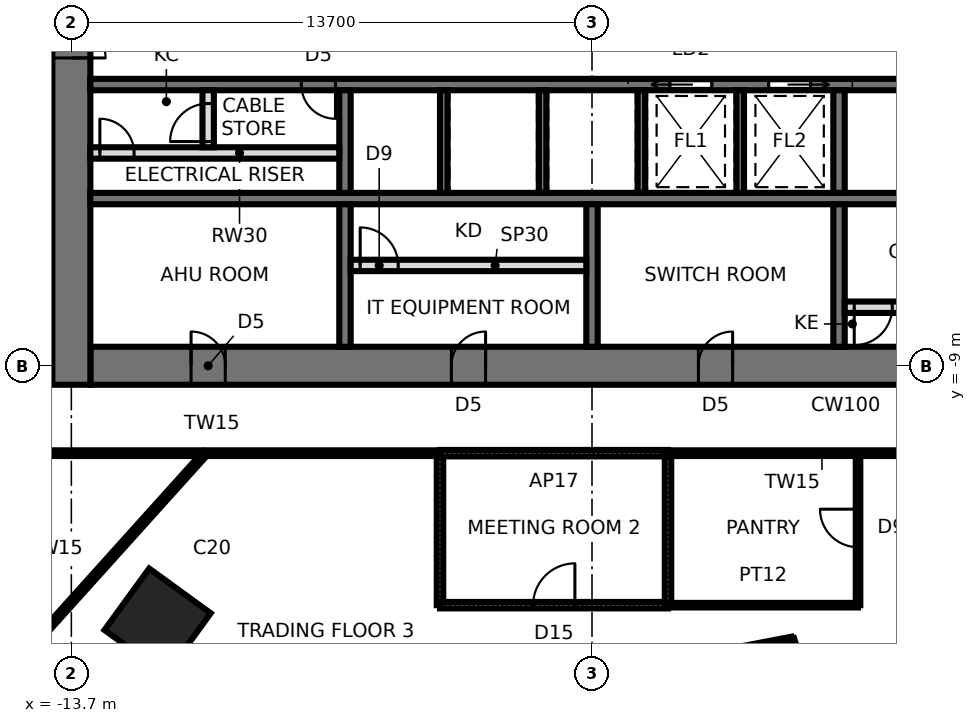
"""IFC4 building model, lengths in metres.
Left out: names, types, materials, properties, quantities, classifications, styles, units other than length and angle.
Written with IfcOpenShell. Run it as: python <this file> out.ifc"""

import sys

from ifc_helpers import new_model, si_unit, direction, frame, frame_2d, origin, origin_2d, place, context, subcontext, project, spatial, rectangle, extrude, element, fill, save


model = new_model("IFC4")
c1 = context("Model", 3, precision=1e-05, world=origin(), true_north=direction((0.0, 1.0)))
c2 = subcontext(c1, "Body", "Model", "MODEL_VIEW")
j1 = project(units=[si_unit("LENGTHUNIT", "METRE"), si_unit("PLANEANGLEUNIT", "RADIAN")], contexts=[c1])
p1 = place(None, origin())
s1 = spatial("IfcSite", under=j1, at=p1, CompositionType="ELEMENT")
p2 = place(p1, origin())
s2 = spatial("IfcBuilding", under=s1, at=p2, CompositionType="ELEMENT")
p3 = place(p2, frame((0.0, 0.0, 65.8)))
s3 = spatial("IfcBuildingStorey", under=s2, at=p3, CompositionType="ELEMENT", Elevation=65.8)
p4 = place(p3, frame((-11.43, -15.733, 0.0), z_axis=(0.0, 0.0, 1.0), x_axis=(-0.587785252292, -0.809016994375, 0.0)))
e1 = element("IfcColumn", 1, at=p4, inside=s3, PredefinedType="COLUMN", context=c2, shape_type="SweptSolid", body=[
    extrude(rectangle(XDim=2.0, YDim=2.0, at=origin_2d()), origin(), (0.0, 0.0, 1.0), 4.2),
])
p5 = place(p3, frame((-13.2, -9.0, 0.0), z_axis=(0.0, 0.0, 1.0), x_axis=(1.0, 0.0, 0.0)))
e2 = element("IfcWall", 2, at=p5, inside=s3, PredefinedType="SHEAR", context=c2, shape_type="SweptSolid", body=[
    extrude(rectangle(XDim=26.4, YDim=1.0, at=frame_2d((13.2, 0.0))), origin(), (0.0, 0.0, 1.0), 4.2),
])
p6 = place(p5, frame((2.65, 0.0, 0.0)))
e3 = element("IfcOpeningElement", 3, at=p6, cuts=e2, PredefinedType="OPENING", context=c2, shape_type="SweptSolid", body=[
    extrude(rectangle(XDim=0.9, YDim=2.1, at=frame_2d((0.45, 1.05))), frame((0.0, 0.51, 0.0), z_axis=(0.0, -1.0, 0.0), x_axis=(1.0, 0.0, 0.0)), (0.0, 0.0, 1.0), 1.02),
])
p7 = place(p5, frame((9.5, 0.0, 0.0)))
e4 = element("IfcOpeningElement", 4, at=p7, cuts=e2, PredefinedType="OPENING", context=c2, shape_type="SweptSolid", body=[
    extrude(rectangle(XDim=0.9, YDim=2.1, at=frame_2d((0.45, 1.05))), frame((0.0, 0.51, 0.0), z_axis=(0.0, -1.0, 0.0), x_axis=(1.0, 0.0, 0.0)), (0.0, 0.0, 1.0), 1.02),
])
p8 = place(p5, frame((16.0, 0.0, 0.0)))
e5 = element("IfcOpeningElement", 5, at=p8, cuts=e2, PredefinedType="OPENING", context=c2, shape_type="SweptSolid", body=[
    extrude(rectangle(XDim=0.9, YDim=2.1, at=frame_2d((0.45, 1.05))), frame((0.0, 0.51, 0.0), z_axis=(0.0, -1.0, 0.0), x_axis=(1.0, 0.0, 0.0)), (0.0, 0.0, 1.0), 1.02),
])
p9 = place(p5, frame((22.85, 0.0, 0.0)))
e6 = element("IfcOpeningElement", 6, at=p9, cuts=e2, PredefinedType="OPENING", context=c2, shape_type="SweptSolid", body=[
    extrude(rectangle(XDim=0.9, YDim=2.1, at=frame_2d((0.45, 1.05))), frame((0.0, 0.51, 0.0), z_axis=(0.0, -1.0, 0.0), x_axis=(1.0, 0.0, 0.0)), (0.0, 0.0, 1.0), 1.02),
])
p10 = place(p3, frame((-13.7, 9.5, 0.0), z_axis=(0.0, 0.0, 1.0), x_axis=(0.0, -1.0, 0.0)))
e7 = element("IfcWall", 7, at=p10, inside=s3, PredefinedType="SHEAR", context=c2, shape_type="SweptSolid", body=[
    extrude(rectangle(XDim=19.0, YDim=1.0, at=frame_2d((9.5, 0.0))), origin(), (0.0, 0.0, 1.0), 4.2),
])
p11 = place(p10, frame((8.6, 0.0, 0.0)))
e8 = element("IfcOpeningElement", 8, at=p11, cuts=e7, PredefinedType="OPENING", context=c2, shape_type="SweptSolid", body=[
    extrude(rectangle(XDim=1.8, YDim=2.4, at=frame_2d((0.9, 1.2))), frame((0.0, 0.51, 0.0), z_axis=(0.0, -1.0, 0.0), x_axis=(1.0, 0.0, 0.0)), (0.0, 0.0, 1.0), 1.02),
])
p12 = place(p3, frame((-13.2, -1.6, 0.0), z_axis=(0.0, 0.0, 1.0), x_axis=(1.0, 0.0, 0.0)))
e9 = element("IfcWall", 9, at=p12, inside=s3, PredefinedType="SHEAR", context=c2, shape_type="SweptSolid", body=[
    extrude(rectangle(XDim=26.4, YDim=0.3, at=frame_2d((13.2, 0.0))), origin(), (0.0, 0.0, 1.0), 4.2),
])
p13 = place(p12, frame((25.15, 0.0, 0.0)))
e10 = element("IfcOpeningElement", 10, at=p13, cuts=e9, PredefinedType="OPENING", context=c2, shape_type="SweptSolid", body=[
    extrude(rectangle(XDim=1.0, YDim=2.1, at=frame_2d((0.5, 1.05))), frame((0.0, 0.16, 0.0), z_axis=(0.0, -1.0, 0.0), x_axis=(1.0, 0.0, 0.0)), (0.0, 0.0, 1.0), 0.32),
])
p14 = place(p12, frame((15.25, 0.0, 0.0)))
e11 = element("IfcOpeningElement", 11, at=p14, cuts=e9, PredefinedType="OPENING", context=c2, shape_type="SweptSolid", body=[
    extrude(rectangle(XDim=1.1, YDim=2.3, at=frame_2d((0.55, 1.15))), frame((0.0, 0.16, 0.0), z_axis=(0.0, -1.0, 0.0), x_axis=(1.0, 0.0, 0.0)), (0.0, 0.0, 1.0), 0.32),
])
p15 = place(p12, frame((17.85, 0.0, 0.0)))
e12 = element("IfcOpeningElement", 12, at=p15, cuts=e9, PredefinedType="OPENING", context=c2, shape_type="SweptSolid", body=[
    extrude(rectangle(XDim=1.1, YDim=2.3, at=frame_2d((0.55, 1.15))), frame((0.0, 0.16, 0.0), z_axis=(0.0, -1.0, 0.0), x_axis=(1.0, 0.0, 0.0)), (0.0, 0.0, 1.0), 0.32),
])
p16 = place(p12, frame((5.55, 0.0, 0.0)))
e13 = element("IfcOpeningElement", 13, at=p16, cuts=e9, PredefinedType="OPENING", context=c2, shape_type="SweptSolid", body=[
    extrude(rectangle(XDim=0.9, YDim=2.1, at=frame_2d((0.45, 1.05))), frame((0.0, 0.16, 0.0), z_axis=(0.0, -1.0, 0.0), x_axis=(1.0, 0.0, 0.0)), (0.0, 0.0, 1.0), 0.32),
])
p17 = place(p3, frame((-13.2, -4.6, 0.0), z_axis=(0.0, 0.0, 1.0), x_axis=(1.0, 0.0, 0.0)))
e14 = element("IfcWall", 14, at=p17, inside=s3, PredefinedType="SHEAR", context=c2, shape_type="SweptSolid", body=[
    extrude(rectangle(XDim=26.4, YDim=0.3, at=frame_2d((13.2, 0.0))), origin(), (0.0, 0.0, 1.0), 4.2),
])
p18 = place(p3, frame((-6.5, -1.75, 0.0), z_axis=(0.0, 0.0, 1.0), x_axis=(0.0, -1.0, 0.0)))
e15 = element("IfcWall", 15, at=p18, inside=s3, PredefinedType="SHEAR", context=c2, shape_type="SweptSolid", body=[
    extrude(rectangle(XDim=2.7, YDim=0.3, at=frame_2d((1.35, 0.0))), origin(), (0.0, 0.0, 1.0), 4.2),
])
p19 = place(p3, frame((-6.5, -4.75, 0.0), z_axis=(0.0, 0.0, 1.0), x_axis=(0.0, -1.0, 0.0)))
e16 = element("IfcWall", 16, at=p19, inside=s3, PredefinedType="SHEAR", context=c2, shape_type="SweptSolid", body=[
    extrude(rectangle(XDim=3.75, YDim=0.3, at=frame_2d((1.875, 0.0))), origin(), (0.0, 0.0, 1.0), 4.2),
])
p20 = place(p3, frame((6.5, -1.75, 0.0), z_axis=(0.0, 0.0, 1.0), x_axis=(0.0, -1.0, 0.0)))
e17 = element("IfcWall", 17, at=p20, inside=s3, PredefinedType="SHEAR", context=c2, shape_type="SweptSolid", body=[
    extrude(rectangle(XDim=2.7, YDim=0.3, at=frame_2d((1.35, 0.0))), origin(), (0.0, 0.0, 1.0), 4.2),
])
p21 = place(p3, frame((6.5, -4.75, 0.0), z_axis=(0.0, 0.0, 1.0), x_axis=(0.0, -1.0, 0.0)))
e18 = element("IfcWall", 18, at=p21, inside=s3, PredefinedType="SHEAR", context=c2, shape_type="SweptSolid", body=[
    extrude(rectangle(XDim=3.75, YDim=0.3, at=frame_2d((1.875, 0.0))), origin(), (0.0, 0.0, 1.0), 4.2),
])
for number, where, z_axis, x_axis in (
    (19, (-3.9, -1.75, 0.0), (0.0, 0.0, 1.0), (0.0, -1.0, 0.0)),
    (20, (-1.3, -1.75, 0.0), (0.0, 0.0, 1.0), (0.0, -1.0, 0.0)),
    (21, (1.3, -1.75, 0.0), (0.0, 0.0, 1.0), (0.0, -1.0, 0.0)),
    (22, (3.9, -1.75, 0.0), (0.0, 0.0, 1.0), (0.0, -1.0, 0.0)),
):
    element("IfcWall", number, at=place(p3, frame(where, z_axis=z_axis, x_axis=x_axis)), inside=s3, PredefinedType="SHEAR", context=c2, shape_type="SweptSolid", body=[
        extrude(rectangle(XDim=2.7, YDim=0.2, at=frame_2d((1.35, 0.0))), origin(), (0.0, 0.0, 1.0), 4.2),
    ])
p22 = place(p3, frame((0.0, -4.75, 0.0), z_axis=(0.0, 0.0, 1.0), x_axis=(0.0, -1.0, 0.0)))
e23 = element("IfcWall", 23, at=p22, inside=s3, PredefinedType="SHEAR", context=c2, shape_type="SweptSolid", body=[
    extrude(rectangle(XDim=3.75, YDim=0.3, at=frame_2d((1.875, 0.0))), origin(), (0.0, 0.0, 1.0), 4.2),
])
p23 = place(p3, frame((-6.35, -6.36, 0.0), z_axis=(0.0, 0.0, 1.0), x_axis=(1.0, 0.0, 0.0)))
e24 = element("IfcWall", 24, at=p23, inside=s3, PredefinedType="PARTITIONING", context=c2, shape_type="SweptSolid", body=[
    extrude(rectangle(XDim=6.2, YDim=0.3, at=frame_2d((3.1, 0.0))), origin(), (0.0, 0.0, 1.0), 4.04),
])
p24 = place(p23, frame((0.25, 0.0, 0.0)))
e25 = element("IfcOpeningElement", 25, at=p24, cuts=e24, PredefinedType="OPENING", context=c2, shape_type="SweptSolid", body=[
    extrude(rectangle(XDim=1.0, YDim=2.4, at=frame_2d((0.5, 1.2))), frame((0.0, 0.16, 0.0), z_axis=(0.0, -1.0, 0.0), x_axis=(1.0, 0.0, 0.0)), (0.0, 0.0, 1.0), 0.32),
])
p25 = place(p3, frame((6.65, -7.46, 0.0), z_axis=(0.0, 0.0, 1.0), x_axis=(1.0, 0.0, 0.0)))
e26 = element("IfcWall", 26, at=p25, inside=s3, PredefinedType="PARTITIONING", context=c2, shape_type="SweptSolid", body=[
    extrude(rectangle(XDim=6.55, YDim=0.3, at=frame_2d((3.275, 0.0))), origin(), (0.0, 0.0, 1.0), 4.04),
])
p26 = place(p25, frame((0.25, 0.0, 0.0)))
e27 = element("IfcOpeningElement", 27, at=p26, cuts=e26, PredefinedType="OPENING", context=c2, shape_type="SweptSolid", body=[
    extrude(rectangle(XDim=1.0, YDim=2.4, at=frame_2d((0.5, 1.2))), frame((0.0, 0.16, 0.0), z_axis=(0.0, -1.0, 0.0), x_axis=(1.0, 0.0, 0.0)), (0.0, 0.0, 1.0), 0.32),
])
p27 = place(p3, frame((-13.2, -3.4, 0.0), z_axis=(0.0, 0.0, 1.0), x_axis=(1.0, 0.0, 0.0)))
e28 = element("IfcWall", 28, at=p27, inside=s3, PredefinedType="SOLIDWALL", context=c2, shape_type="SweptSolid", body=[
    extrude(rectangle(XDim=6.55, YDim=0.3, at=frame_2d((3.275, 0.0))), origin(), (0.0, 0.0, 1.0), 4.04),
])
p28 = place(p27, frame((0.25, 0.0, 0.0)))
e29 = element("IfcOpeningElement", 29, at=p28, cuts=e28, PredefinedType="OPENING", context=c2, shape_type="SweptSolid", body=[
    extrude(rectangle(XDim=0.9, YDim=2.1, at=frame_2d((0.45, 1.05))), frame((0.0, 0.16, 0.0), z_axis=(0.0, -1.0, 0.0), x_axis=(1.0, 0.0, 0.0)), (0.0, 0.0, 1.0), 0.32),
])
p29 = place(p3, frame((-10.1, -3.25, 0.0), z_axis=(0.0, 0.0, 1.0), x_axis=(0.0, 1.0, 0.0)))
e30 = element("IfcWall", 30, at=p29, inside=s3, PredefinedType="PARTITIONING", context=c2, shape_type="SweptSolid", body=[
    extrude(rectangle(XDim=1.5, YDim=0.3, at=frame_2d((0.75, 0.0))), origin(), (0.0, 0.0, 1.0), 4.04),
])
p30 = place(p29, frame((0.15, 0.0, 0.0)))
e31 = element("IfcOpeningElement", 31, at=p30, cuts=e30, PredefinedType="OPENING", context=c2, shape_type="SweptSolid", body=[
    extrude(rectangle(XDim=1.0, YDim=2.4, at=frame_2d((0.5, 1.2))), frame((0.0, 0.16, 0.0), z_axis=(0.0, -1.0, 0.0), x_axis=(1.0, 0.0, 0.0)), (0.0, 0.0, 1.0), 0.32),
])
p31 = place(p3, frame((-10.175, -11.3, 0.0), z_axis=(0.0, 0.0, 1.0), x_axis=(-0.669136564673, -0.743139460544, 0.0)))
e32 = element("IfcWall", 32, at=p31, inside=s3, PredefinedType="PARTITIONING", context=c2, shape_type="SweptSolid", body=[
    extrude(rectangle(XDim=9.026, YDim=0.15, at=frame_2d((4.513, 0.0))), origin(), (0.0, 0.0, 1.0), 4.04),
])
p32 = place(p3, frame((-16.0, -11.3, 0.0), z_axis=(0.0, 0.0, 1.0), x_axis=(1.0, 0.0, 0.0)))
e33 = element("IfcWall", 33, at=p32, inside=s3, PredefinedType="PARTITIONING", context=c2, shape_type="SweptSolid", body=[
    extrude(rectangle(XDim=12.0, YDim=0.15, at=frame_2d((6.0, 0.0))), origin(), (0.0, 0.0, 1.0), 4.04),
])
p33 = place(p3, frame((-4.0, -11.3, 0.0), z_axis=(0.0, 0.0, 1.0), x_axis=(0.0, -1.0, 0.0)))
e34 = element("IfcWall", 34, at=p33, inside=s3, PredefinedType="PARTITIONING", context=c2, shape_type="SweptSolid", body=[
    extrude(rectangle(XDim=4.0, YDim=0.17, at=frame_2d((2.0, 0.0))), origin(), (0.0, 0.0, 1.0), 4.04),
])
p34 = place(p3, frame((2.0, -11.3, 0.0), z_axis=(0.0, 0.0, 1.0), x_axis=(-1.0, 0.0, 0.0)))
e35 = element("IfcWall", 35, at=p34, inside=s3, PredefinedType="PARTITIONING", context=c2, shape_type="SweptSolid", body=[
    extrude(rectangle(XDim=6.0, YDim=0.17, at=frame_2d((3.0, 0.0))), origin(), (0.0, 0.0, 1.0), 4.04),
])
p35 = place(p3, frame((-4.0, -15.3, 0.0), z_axis=(0.0, 0.0, 1.0), x_axis=(1.0, 0.0, 0.0)))
e36 = element("IfcWall", 36, at=p35, inside=s3, PredefinedType="PARTITIONING", context=c2, shape_type="SweptSolid", body=[
    extrude(rectangle(XDim=6.0, YDim=0.17, at=frame_2d((3.0, 0.0))), origin(), (0.0, 0.0, 1.0), 3.586),
])
p36 = place(p35, frame((2.45, 0.0, 0.0)))
e37 = element("IfcOpeningElement", 37, at=p36, cuts=e36, PredefinedType="OPENING", context=c2, shape_type="SweptSolid", body=[
    extrude(rectangle(XDim=1.1, YDim=2.4, at=frame_2d((0.55, 1.2))), frame((0.0, 0.095, 0.0), z_axis=(0.0, -1.0, 0.0), x_axis=(1.0, 0.0, 0.0)), (0.0, 0.0, 1.0), 0.19),
])
p37 = place(p3, frame((2.0, -11.3, 0.0), z_axis=(0.0, 0.0, 1.0), x_axis=(0.0, -1.0, 0.0)))
e38 = element("IfcWall", 38, at=p37, inside=s3, PredefinedType="PARTITIONING", context=c2, shape_type="SweptSolid", body=[
    extrude(rectangle(XDim=4.0, YDim=0.17, at=frame_2d((2.0, 0.0))), origin(), (0.0, 0.0, 1.0), 4.04),
])
p38 = place(p3, frame((5.26, -16.188, 0.0), z_axis=(0.0, 0.0, 1.0), x_axis=(-0.982089213151, -0.188416499842, 0.0)))
e39 = element("IfcWall", 39, at=p38, inside=s3, PredefinedType="PARTITIONING", context=c2, shape_type="SweptSolid", body=[
    extrude(rectangle(XDim=3.552, YDim=0.12, at=frame_2d((1.776, 0.0))), origin(), (0.0, 0.0, 1.0), 4.04),
])
p39 = place(p3, frame((2.0, -15.3, 0.0), z_axis=(0.0, 0.0, 1.0), x_axis=(1.0, 0.0, 0.0)))
e40 = element("IfcWall", 40, at=p39, inside=s3, PredefinedType="PARTITIONING", context=c2, shape_type="SweptSolid", body=[
    extrude(rectangle(XDim=5.0, YDim=0.12, at=frame_2d((2.5, 0.0))), origin(), (0.0, 0.0, 1.0), 3.586),
])
p40 = place(p3, frame((7.33, -22.56, 0.0), z_axis=(0.0, 0.0, 1.0), x_axis=(-0.309003676349, 0.951060843481, 0.0)))
e41 = element("IfcWall", 41, at=p40, inside=s3, PredefinedType="PARTITIONING", context=c2, shape_type="SweptSolid", body=[
    extrude(rectangle(XDim=6.7, YDim=0.12, at=frame_2d((3.35, 0.0))), origin(), (0.0, 0.0, 1.0), 2.84),
])
p41 = place(p3, frame((7.0, -15.3, 0.0), z_axis=(0.0, 0.0, 1.0), x_axis=(0.0, 1.0, 0.0)))
e42 = element("IfcWall", 42, at=p41, inside=s3, PredefinedType="PARTITIONING", context=c2, shape_type="SweptSolid", body=[
    extrude(rectangle(XDim=4.0, YDim=0.12, at=frame_2d((2.0, 0.0))), origin(), (0.0, 0.0, 1.0), 4.04),
])
p42 = place(p41, frame((1.526, 0.0, 0.0)))
e43 = element("IfcOpeningElement", 43, at=p42, cuts=e42, PredefinedType="OPENING", context=c2, shape_type="SweptSolid", body=[
    extrude(rectangle(XDim=1.0, YDim=2.4, at=frame_2d((0.5, 1.2))), frame((0.0, 0.07, 0.0), z_axis=(0.0, -1.0, 0.0), x_axis=(1.0, 0.0, 0.0)), (0.0, 0.0, 1.0), 0.14),
])
p43 = place(p3, frame((2.0, -11.3, 0.0), z_axis=(0.0, 0.0, 1.0), x_axis=(1.0, 0.0, 0.0)))
e44 = element("IfcWall", 44, at=p43, inside=s3, PredefinedType="PARTITIONING", context=c2, shape_type="SweptSolid", body=[
    extrude(rectangle(XDim=14.0, YDim=0.15, at=frame_2d((7.0, 0.0))), origin(), (0.0, 0.0, 1.0), 4.04),
])
p44 = place(p43, frame((8.252, 0.0, 0.0)))
e45 = element("IfcOpeningElement", 45, at=p44, cuts=e44, PredefinedType="OPENING", context=c2, shape_type="SweptSolid", body=[
    extrude(rectangle(XDim=2.0, YDim=2.4, at=frame_2d((1.0, 1.2))), frame((0.0, 0.085, 0.0), z_axis=(0.0, -1.0, 0.0), x_axis=(1.0, 0.0, 0.0)), (0.0, 0.0, 1.0), 0.17),
])
p45 = place(p11, origin())
e46 = element("IfcDoor", 46, at=p45, inside=s3, OperationType="DOUBLE_DOOR_SINGLE_SWING", PredefinedType="DOOR", context=c2, shape_type="SweptSolid", body=[
    extrude(rectangle(XDim=1.72, YDim=2.36, at=frame_2d((0.9, 1.18))), frame((0.0, 0.025, 0.0), z_axis=(0.0, -1.0, 0.0), x_axis=(1.0, 0.0, 0.0)), (0.0, 0.0, 1.0), 0.05),
    extrude(rectangle(XDim=0.04, YDim=2.4, at=frame_2d((0.02, 1.2))), frame((0.0, 0.25, 0.0), z_axis=(0.0, -1.0, 0.0), x_axis=(1.0, 0.0, 0.0)), (0.0, 0.0, 1.0), 0.5),
    extrude(rectangle(XDim=0.04, YDim=2.4, at=frame_2d((1.78, 1.2))), frame((0.0, 0.25, 0.0), z_axis=(0.0, -1.0, 0.0), x_axis=(1.0, 0.0, 0.0)), (0.0, 0.0, 1.0), 0.5),
    extrude(rectangle(XDim=1.72, YDim=0.04, at=frame_2d((0.9, 2.38))), frame((0.0, 0.25, 0.0), z_axis=(0.0, -1.0, 0.0), x_axis=(1.0, 0.0, 0.0)), (0.0, 0.0, 1.0), 0.5),
])
fill(e8, e46)
p46 = place(p14, frame((1.1, 0.0, 0.0), z_axis=(0.0, 0.0, 1.0), x_axis=(-1.0, 0.0, 0.0)))
e47 = element("IfcDoor", 47, at=p46, inside=s3, OperationType="SLIDING_TO_RIGHT", PredefinedType="DOOR", context=c2, shape_type="SweptSolid", body=[
    extrude(rectangle(XDim=1.1, YDim=2.3, at=frame_2d((0.55, 1.15))), frame((0.0, 0.025, 0.0), z_axis=(0.0, -1.0, 0.0), x_axis=(1.0, 0.0, 0.0)), (0.0, 0.0, 1.0), 0.05),
])
fill(e11, e47)
p47 = place(p15, frame((1.1, 0.0, 0.0), z_axis=(0.0, 0.0, 1.0), x_axis=(-1.0, 0.0, 0.0)))
e48 = element("IfcDoor", 48, at=p47, inside=s3, OperationType="SLIDING_TO_LEFT", PredefinedType="DOOR", context=c2, shape_type="SweptSolid", body=[
    extrude(rectangle(XDim=1.1, YDim=2.3, at=frame_2d((0.55, 1.15))), frame((0.0, 0.025, 0.0), z_axis=(0.0, -1.0, 0.0), x_axis=(1.0, 0.0, 0.0)), (0.0, 0.0, 1.0), 0.05),
])
fill(e12, e48)
p48 = place(p16, frame((0.9, 0.0, 0.0), z_axis=(0.0, 0.0, 1.0), x_axis=(-1.0, 0.0, 0.0)))
e49 = element("IfcDoor", 49, at=p48, inside=s3, OperationType="SINGLE_SWING_LEFT", PredefinedType="DOOR", context=c2, shape_type="SweptSolid", body=[
    extrude(rectangle(XDim=0.9, YDim=2.1, at=frame_2d((0.45, 1.05))), frame((0.0, 0.025, 0.0), z_axis=(0.0, -1.0, 0.0), x_axis=(1.0, 0.0, 0.0)), (0.0, 0.0, 1.0), 0.05),
])
fill(e13, e49)
p49 = place(p6, origin())
e50 = element("IfcDoor", 50, at=p49, inside=s3, OperationType="SINGLE_SWING_LEFT", PredefinedType="DOOR", context=c2, shape_type="SweptSolid", body=[
    extrude(rectangle(XDim=0.82, YDim=2.06, at=frame_2d((0.45, 1.03))), frame((0.0, 0.025, 0.0), z_axis=(0.0, -1.0, 0.0), x_axis=(1.0, 0.0, 0.0)), (0.0, 0.0, 1.0), 0.05),
    extrude(rectangle(XDim=0.04, YDim=2.1, at=frame_2d((0.02, 1.05))), frame((0.0, 0.25, 0.0), z_axis=(0.0, -1.0, 0.0), x_axis=(1.0, 0.0, 0.0)), (0.0, 0.0, 1.0), 0.5),
    extrude(rectangle(XDim=0.04, YDim=2.1, at=frame_2d((0.88, 1.05))), frame((0.0, 0.25, 0.0), z_axis=(0.0, -1.0, 0.0), x_axis=(1.0, 0.0, 0.0)), (0.0, 0.0, 1.0), 0.5),
    extrude(rectangle(XDim=0.82, YDim=0.04, at=frame_2d((0.45, 2.08))), frame((0.0, 0.25, 0.0), z_axis=(0.0, -1.0, 0.0), x_axis=(1.0, 0.0, 0.0)), (0.0, 0.0, 1.0), 0.5),
])
fill(e3, e50)
p50 = place(p7, origin())
e51 = element("IfcDoor", 51, at=p50, inside=s3, OperationType="SINGLE_SWING_RIGHT", PredefinedType="DOOR", context=c2, shape_type="SweptSolid", body=[
    extrude(rectangle(XDim=0.82, YDim=2.06, at=frame_2d((0.45, 1.03))), frame((0.0, 0.025, 0.0), z_axis=(0.0, -1.0, 0.0), x_axis=(1.0, 0.0, 0.0)), (0.0, 0.0, 1.0), 0.05),
    extrude(rectangle(XDim=0.04, YDim=2.1, at=frame_2d((0.02, 1.05))), frame((0.0, 0.25, 0.0), z_axis=(0.0, -1.0, 0.0), x_axis=(1.0, 0.0, 0.0)), (0.0, 0.0, 1.0), 0.5),
    extrude(rectangle(XDim=0.04, YDim=2.1, at=frame_2d((0.88, 1.05))), frame((0.0, 0.25, 0.0), z_axis=(0.0, -1.0, 0.0), x_axis=(1.0, 0.0, 0.0)), (0.0, 0.0, 1.0), 0.5),
    extrude(rectangle(XDim=0.82, YDim=0.04, at=frame_2d((0.45, 2.08))), frame((0.0, 0.25, 0.0), z_axis=(0.0, -1.0, 0.0), x_axis=(1.0, 0.0, 0.0)), (0.0, 0.0, 1.0), 0.5),
])
fill(e4, e51)
p51 = place(p8, origin())
e52 = element("IfcDoor", 52, at=p51, inside=s3, OperationType="SINGLE_SWING_RIGHT", PredefinedType="DOOR", context=c2, shape_type="SweptSolid", body=[
    extrude(rectangle(XDim=0.82, YDim=2.06, at=frame_2d((0.45, 1.03))), frame((0.0, 0.025, 0.0), z_axis=(0.0, -1.0, 0.0), x_axis=(1.0, 0.0, 0.0)), (0.0, 0.0, 1.0), 0.05),
    extrude(rectangle(XDim=0.04, YDim=2.1, at=frame_2d((0.02, 1.05))), frame((0.0, 0.25, 0.0), z_axis=(0.0, -1.0, 0.0), x_axis=(1.0, 0.0, 0.0)), (0.0, 0.0, 1.0), 0.5),
    extrude(rectangle(XDim=0.04, YDim=2.1, at=frame_2d((0.88, 1.05))), frame((0.0, 0.25, 0.0), z_axis=(0.0, -1.0, 0.0), x_axis=(1.0, 0.0, 0.0)), (0.0, 0.0, 1.0), 0.5),
    extrude(rectangle(XDim=0.82, YDim=0.04, at=frame_2d((0.45, 2.08))), frame((0.0, 0.25, 0.0), z_axis=(0.0, -1.0, 0.0), x_axis=(1.0, 0.0, 0.0)), (0.0, 0.0, 1.0), 0.5),
])
fill(e5, e52)
p52 = place(p24, origin())
e53 = element("IfcDoor", 53, at=p52, inside=s3, OperationType="SINGLE_SWING_LEFT", PredefinedType="DOOR", context=c2, shape_type="SweptSolid", body=[
    extrude(rectangle(XDim=1.0, YDim=2.4, at=frame_2d((0.5, 1.2))), frame((0.0, 0.025, 0.0), z_axis=(0.0, -1.0, 0.0), x_axis=(1.0, 0.0, 0.0)), (0.0, 0.0, 1.0), 0.05),
])
fill(e25, e53)
p53 = place(p26, frame((1.0, 0.0, 0.0), z_axis=(0.0, 0.0, 1.0), x_axis=(-1.0, 0.0, 0.0)))
e54 = element("IfcDoor", 54, at=p53, inside=s3, OperationType="SINGLE_SWING_RIGHT", PredefinedType="DOOR", context=c2, shape_type="SweptSolid", body=[
    extrude(rectangle(XDim=1.0, YDim=2.4, at=frame_2d((0.5, 1.2))), frame((0.0, 0.025, 0.0), z_axis=(0.0, -1.0, 0.0), x_axis=(1.0, 0.0, 0.0)), (0.0, 0.0, 1.0), 0.05),
])
fill(e27, e54)
p54 = place(p28, origin())
e55 = element("IfcDoor", 55, at=p54, inside=s3, OperationType="SINGLE_SWING_LEFT", PredefinedType="DOOR", context=c2, shape_type="SweptSolid", body=[
    extrude(rectangle(XDim=0.9, YDim=2.1, at=frame_2d((0.45, 1.05))), frame((0.0, 0.025, 0.0), z_axis=(0.0, -1.0, 0.0), x_axis=(1.0, 0.0, 0.0)), (0.0, 0.0, 1.0), 0.05),
])
fill(e29, e55)
p55 = place(p30, origin())
e56 = element("IfcDoor", 56, at=p55, inside=s3, OperationType="SINGLE_SWING_LEFT", PredefinedType="DOOR", context=c2, shape_type="SweptSolid", body=[
    extrude(rectangle(XDim=1.0, YDim=2.4, at=frame_2d((0.5, 1.2))), frame((0.0, 0.025, 0.0), z_axis=(0.0, -1.0, 0.0), x_axis=(1.0, 0.0, 0.0)), (0.0, 0.0, 1.0), 0.05),
])
fill(e31, e56)
p56 = place(p36, origin())
e57 = element("IfcDoor", 57, at=p56, inside=s3, OperationType="SINGLE_SWING_RIGHT", PredefinedType="DOOR", context=c2, shape_type="SweptSolid", body=[
    extrude(rectangle(XDim=1.1, YDim=2.4, at=frame_2d((0.55, 1.2))), frame((0.0, 0.025, 0.0), z_axis=(0.0, -1.0, 0.0), x_axis=(1.0, 0.0, 0.0)), (0.0, 0.0, 1.0), 0.05),
])
fill(e37, e57)
p57 = place(p42, origin())
e58 = element("IfcDoor", 58, at=p57, inside=s3, OperationType="SINGLE_SWING_RIGHT", PredefinedType="DOOR", context=c2, shape_type="SweptSolid", body=[
    extrude(rectangle(XDim=1.0, YDim=2.4, at=frame_2d((0.5, 1.2))), frame((0.0, 0.025, 0.0), z_axis=(0.0, -1.0, 0.0), x_axis=(1.0, 0.0, 0.0)), (0.0, 0.0, 1.0), 0.05),
])
fill(e43, e58)
save(model, sys.argv[1])
